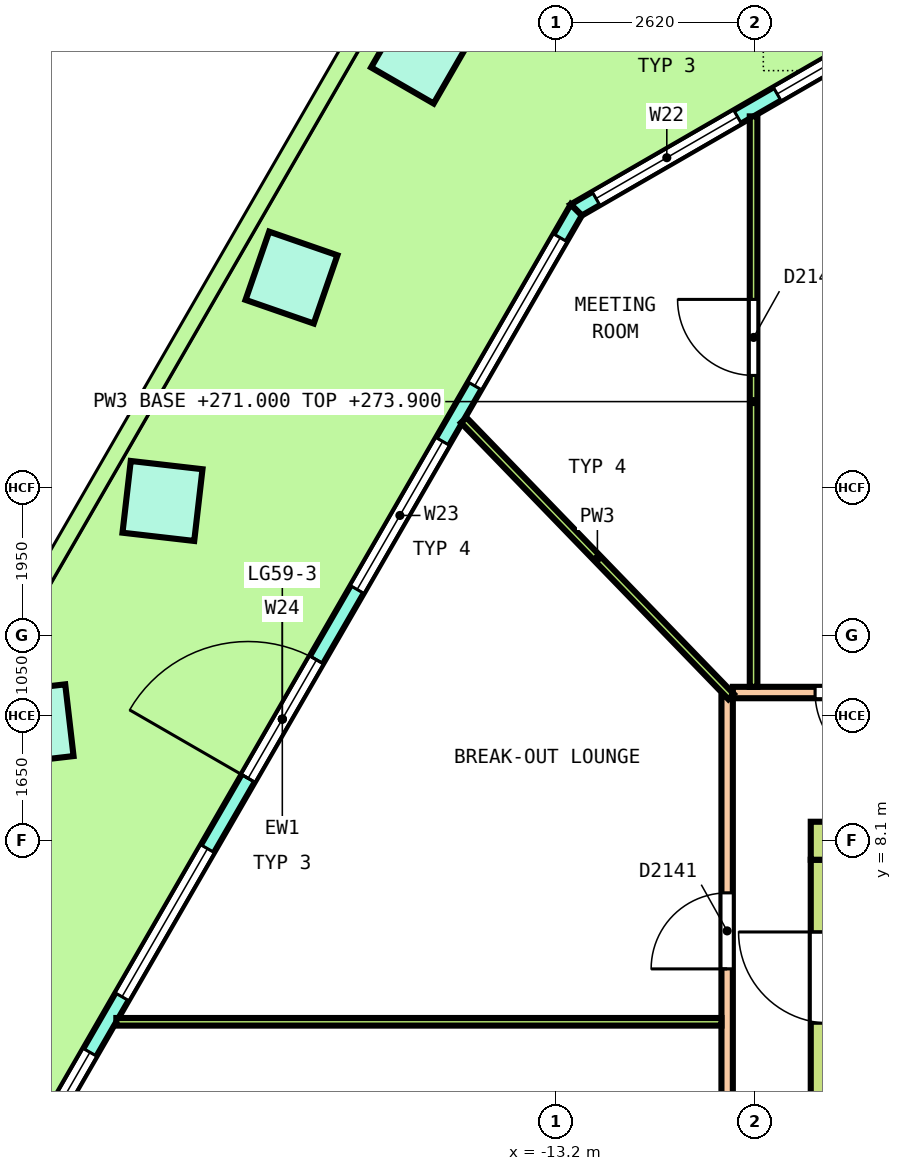
"""IFC4 building model, lengths in metres.
Left out: names, types, materials, properties, quantities, classifications, styles, units other than length and angle.
Written with IfcOpenShell. Run it as: python <this file> out.ifc"""

import sys

from ifc_helpers import new_model, si_unit, direction, frame, frame_2d, origin, origin_2d, place, context, subcontext, project, spatial, polyline, rectangle, outline, extrude, element, fill, save


model = new_model("IFC4")
c1 = context("Model", 3, precision=1e-05, world=origin(), true_north=direction((0.0, 1.0)))
c2 = subcontext(c1, "Body", "Model", "MODEL_VIEW")
j1 = project(units=[si_unit("LENGTHUNIT", "METRE"), si_unit("PLANEANGLEUNIT", "RADIAN")], contexts=[c1])
p1 = place(None, origin())
s1 = spatial("IfcSite", under=j1, at=p1, CompositionType="ELEMENT")
p2 = place(p1, origin())
s2 = spatial("IfcBuilding", under=s1, at=p2, CompositionType="ELEMENT")
p3 = place(p2, frame((0.0, 0.0, 271.0)))
s3 = spatial("IfcBuildingStorey", under=s2, at=p3, CompositionType="ELEMENT", Elevation=271.0)
p4 = place(p3, frame((-14.985, 18.448, 0.0), z_axis=(-0.036230378439, 0.0, 0.99934346432), x_axis=(-0.499425499283, -0.866167613071, -0.018106262248)))
e1 = element("IfcColumn", 1, at=p4, inside=s3, PredefinedType="COLUMN", context=c2, shape_type="SweptSolid", body=[
    extrude(rectangle(XDim=0.95, YDim=0.95, at=origin_2d()), origin(), (0.0, 0.0, 1.0), 3.652),
])
p5 = place(p3, frame((-16.682, 15.509, 0.0), z_axis=(-0.032624119908, 0.006284154245, 0.999447935715), x_axis=(-0.500036299202, -0.865936128062, -0.010877573109)))
e2 = element("IfcColumn", 2, at=p5, inside=s3, PredefinedType="COLUMN", context=c2, shape_type="SweptSolid", body=[
    extrude(rectangle(XDim=0.95, YDim=0.95, at=origin_2d()), origin(), (0.0, 0.0, 1.0), 3.652),
])
p6 = place(p3, frame((-18.379, 12.57, 0.0), z_axis=(-0.029015583354, 0.012568962375, 0.99949993352), x_axis=(-0.499848966802, -0.86610502362, -0.003619177736)))
e3 = element("IfcColumn", 3, at=p6, inside=s3, PredefinedType="COLUMN", context=c2, shape_type="SweptSolid", body=[
    extrude(rectangle(XDim=0.95, YDim=0.95, at=origin_2d()), origin(), (0.0, 0.0, 1.0), 3.652),
])
p7 = place(p3, frame((-20.075, 9.631, 0.0), z_axis=(-0.025405304683, 0.018920266383, 0.999498171091), x_axis=(-0.501003025271, -0.865437843341, 0.003648010707)))
e4 = element("IfcColumn", 4, at=p7, inside=s3, PredefinedType="COLUMN", context=c2, shape_type="SweptSolid", body=[
    extrude(rectangle(XDim=0.95, YDim=0.95, at=origin_2d()), origin(), (0.0, 0.0, 1.0), 3.652),
])
p8 = place(p3, frame((-8.169, 19.15, 0.0), z_axis=(0.0, 0.0, 1.0), x_axis=(-0.866026017613, -0.499998936816, 0.0)))
e5 = element("IfcWall", 5, at=p8, inside=s3, PredefinedType="SOLIDWALL", context=c2, shape_type="SweptSolid", body=[
    extrude(outline(polyline([(-0.027, -0.1), (1.084, -0.1), (2.196, -0.1), (3.307, -0.1), (4.419, -0.1), (5.53, -0.1), (5.477, 0.1), (4.387, 0.1), (3.297, 0.1), (2.207, 0.1), (1.117, 0.1), (0.027, 0.1), (-0.027, -0.1)])), origin(), (0.0, 0.0, 1.0), 3.7),
])
p9 = place(p8, frame((0.301, 0.0, 0.1)))
e6 = element("IfcOpeningElement", 6, at=p9, cuts=e5, PredefinedType="OPENING", context=c2, shape_type="SweptSolid", body=[
    extrude(rectangle(XDim=2.15, YDim=2.75, at=frame_2d((1.075, 1.375))), frame((0.0, 0.11, 0.0), z_axis=(0.0, -1.0, 0.0), x_axis=(1.0, 0.0, 0.0)), (0.0, 0.0, 1.0), 0.22),
])
p10 = place(p8, frame((3.052, 0.0, 0.1)))
e7 = element("IfcOpeningElement", 7, at=p10, cuts=e5, PredefinedType="OPENING", context=c2, shape_type="SweptSolid", body=[
    extrude(rectangle(XDim=2.15, YDim=2.75, at=frame_2d((1.075, 1.375))), frame((0.0, 0.11, 0.0), z_axis=(0.0, -1.0, 0.0), x_axis=(1.0, 0.0, 0.0)), (0.0, 0.0, 1.0), 0.22),
])
p11 = place(p3, frame((-12.935, 16.398, 0.0), z_axis=(0.0, 0.0, 1.0), x_axis=(-0.500001185373, -0.866024719408, 0.0)))
e8 = element("IfcWall", 8, at=p11, inside=s3, PredefinedType="SOLIDWALL", context=c2, shape_type="SweptSolid", body=[
    extrude(outline(polyline([(-0.027, -0.1), (1.008, -0.1), (2.043, -0.1), (3.077, -0.1), (4.112, -0.1), (5.147, -0.1), (6.182, -0.1), (7.216, -0.1), (8.251, -0.1), (9.286, -0.1), (10.321, -0.1), (11.355, -0.1), (12.39, -0.1), (13.425, -0.1), (14.459, -0.1), (15.494, -0.1), (15.44, 0.1), (14.413, 0.1), (13.385, 0.1), (12.358, 0.1), (11.33, 0.1), (10.302, 0.1), (9.275, 0.1), (8.247, 0.1), (7.22, 0.1), (6.192, 0.1), (5.165, 0.1), (4.137, 0.1), (3.11, 0.1), (2.082, 0.1), (1.054, 0.1), (0.027, 0.1), (-0.027, -0.1)])), origin(), (0.0, 0.0, 1.0), 3.7),
])
p12 = place(p11, frame((0.422, 0.0, 0.1)))
e9 = element("IfcOpeningElement", 9, at=p12, cuts=e8, PredefinedType="OPENING", context=c2, shape_type="SweptSolid", body=[
    extrude(rectangle(XDim=2.25, YDim=2.75, at=frame_2d((1.125, 1.375))), frame((0.0, 0.11, 0.0), z_axis=(0.0, -1.0, 0.0), x_axis=(1.0, 0.0, 0.0)), (0.0, 0.0, 1.0), 0.22),
])
p13 = place(p11, frame((3.515, 0.0, 0.1)))
e10 = element("IfcOpeningElement", 10, at=p13, cuts=e8, PredefinedType="OPENING", context=c2, shape_type="SweptSolid", body=[
    extrude(rectangle(XDim=2.25, YDim=2.75, at=frame_2d((1.125, 1.375))), frame((0.0, 0.11, 0.0), z_axis=(0.0, -1.0, 0.0), x_axis=(1.0, 0.0, 0.0)), (0.0, 0.0, 1.0), 0.22),
])
p14 = place(p11, frame((6.834, 0.0, 0.0)))
e11 = element("IfcOpeningElement", 11, at=p14, cuts=e8, PredefinedType="OPENING", context=c2, shape_type="SweptSolid", body=[
    extrude(rectangle(XDim=1.8, YDim=2.4, at=frame_2d((0.9, 1.2))), frame((0.0, 0.11, 0.0), z_axis=(0.0, -1.0, 0.0), x_axis=(1.0, 0.0, 0.0)), (0.0, 0.0, 1.0), 0.22),
])
p15 = place(p11, frame((6.834, 0.0, 2.55)))
e12 = element("IfcOpeningElement", 12, at=p15, cuts=e8, PredefinedType="OPENING", context=c2, shape_type="SweptSolid", body=[
    extrude(rectangle(XDim=1.8, YDim=0.3, at=frame_2d((0.9, 0.15))), frame((0.0, 0.11, 0.0), z_axis=(0.0, -1.0, 0.0), x_axis=(1.0, 0.0, 0.0)), (0.0, 0.0, 1.0), 0.22),
])
p16 = place(p11, frame((9.702, 0.0, 0.1)))
e13 = element("IfcOpeningElement", 13, at=p16, cuts=e8, PredefinedType="OPENING", context=c2, shape_type="SweptSolid", body=[
    extrude(rectangle(XDim=2.25, YDim=2.75, at=frame_2d((1.125, 1.375))), frame((0.0, 0.11, 0.0), z_axis=(0.0, -1.0, 0.0), x_axis=(1.0, 0.0, 0.0)), (0.0, 0.0, 1.0), 0.22),
])
p17 = place(p11, frame((12.796, 0.0, 0.1)))
e14 = element("IfcOpeningElement", 14, at=p17, cuts=e8, PredefinedType="OPENING", context=c2, shape_type="SweptSolid", body=[
    extrude(rectangle(XDim=2.25, YDim=2.75, at=frame_2d((1.125, 1.375))), frame((0.0, 0.11, 0.0), z_axis=(0.0, -1.0, 0.0), x_axis=(1.0, 0.0, 0.0)), (0.0, 0.0, 1.0), 0.22),
])
p18 = place(p3, frame((-9.85, 8.1, 0.0), z_axis=(0.0, 0.0, 1.0), x_axis=(1.0, 0.0, 0.0)))
e15 = element("IfcWall", 15, at=p18, inside=s3, PredefinedType="SHEAR", context=c2, shape_type="SweptSolid", body=[
    extrude(rectangle(XDim=19.7, YDim=0.5, at=frame_2d((9.85, 0.0))), origin(), (0.0, 0.0, 1.0), 3.7),
])
p19 = place(p18, frame((10.775, 0.0, 0.0)))
e16 = element("IfcOpeningElement", 16, at=p19, cuts=e15, PredefinedType="OPENING", context=c2, shape_type="SweptSolid", body=[
    extrude(rectangle(XDim=1.4, YDim=2.1, at=frame_2d((0.7, 1.05))), frame((0.0, 0.26, 0.0), z_axis=(0.0, -1.0, 0.0), x_axis=(1.0, 0.0, 0.0)), (0.0, 0.0, 1.0), 0.52),
])
p20 = place(p3, frame((-9.6, -7.85, 0.0), z_axis=(0.0, 0.0, 1.0), x_axis=(0.0, 1.0, 0.0)))
e17 = element("IfcWall", 17, at=p20, inside=s3, PredefinedType="SHEAR", context=c2, shape_type="SweptSolid", body=[
    extrude(rectangle(XDim=15.7, YDim=0.5, at=frame_2d((7.85, 0.0))), origin(), (0.0, 0.0, 1.0), 3.7),
])
p21 = place(p20, frame((6.65, 0.0, 0.0)))
e18 = element("IfcOpeningElement", 18, at=p21, cuts=e17, PredefinedType="OPENING", context=c2, shape_type="SweptSolid", body=[
    extrude(rectangle(XDim=2.4, YDim=2.1, at=frame_2d((1.2, 1.05))), frame((0.0, 0.26, 0.0), z_axis=(0.0, -1.0, 0.0), x_axis=(1.0, 0.0, 0.0)), (0.0, 0.0, 1.0), 0.52),
])
p22 = place(p20, frame((13.55, 0.0, 0.0)))
e19 = element("IfcOpeningElement", 19, at=p22, cuts=e17, PredefinedType="OPENING", context=c2, shape_type="SweptSolid", body=[
    extrude(rectangle(XDim=1.2, YDim=2.1, at=frame_2d((0.6, 1.05))), frame((0.0, 0.26, 0.0), z_axis=(0.0, -1.0, 0.0), x_axis=(1.0, 0.0, 0.0)), (0.0, 0.0, 1.0), 0.52),
])
p23 = place(p20, frame((0.95, 0.0, 0.0)))
e20 = element("IfcOpeningElement", 20, at=p23, cuts=e17, PredefinedType="OPENING", context=c2, shape_type="SweptSolid", body=[
    extrude(rectangle(XDim=1.2, YDim=2.1, at=frame_2d((0.6, 1.05))), frame((0.0, 0.26, 0.0), z_axis=(0.0, -1.0, 0.0), x_axis=(1.0, 0.0, 0.0)), (0.0, 0.0, 1.0), 0.52),
])
p24 = place(p3, frame((-10.875, 10.05, 0.0), z_axis=(0.0, 0.0, 1.0), x_axis=(1.0, 0.0, 0.0)))
e21 = element("IfcWall", 21, at=p24, inside=s3, PredefinedType="PARTITIONING", context=c2, shape_type="SweptSolid", body=[
    extrude(rectangle(XDim=21.775, YDim=0.15, at=frame_2d((10.887, 0.0))), origin(), (0.0, 0.0, 1.0), 2.9),
])
p25 = place(p24, frame((17.089, 0.0, 0.0)))
e22 = element("IfcOpeningElement", 22, at=p25, cuts=e21, PredefinedType="OPENING", context=c2, shape_type="SweptSolid", body=[
    extrude(rectangle(XDim=1.2, YDim=2.1, at=frame_2d((0.6, 1.05))), frame((0.0, 0.085, 0.0), z_axis=(0.0, -1.0, 0.0), x_axis=(1.0, 0.0, 0.0)), (0.0, 0.0, 1.0), 0.17),
])
p26 = place(p24, frame((14.048, 0.0, 0.0)))
e23 = element("IfcOpeningElement", 23, at=p26, cuts=e21, PredefinedType="OPENING", context=c2, shape_type="SweptSolid", body=[
    extrude(rectangle(XDim=1.0, YDim=2.1, at=frame_2d((0.5, 1.05))), frame((0.0, 0.085, 0.0), z_axis=(0.0, -1.0, 0.0), x_axis=(1.0, 0.0, 0.0)), (0.0, 0.0, 1.0), 0.17),
])
p27 = place(p24, frame((7.521, 0.0, 0.0)))
e24 = element("IfcOpeningElement", 24, at=p27, cuts=e21, PredefinedType="OPENING", context=c2, shape_type="SweptSolid", body=[
    extrude(rectangle(XDim=1.0, YDim=2.1, at=frame_2d((0.5, 1.05))), frame((0.0, 0.085, 0.0), z_axis=(0.0, -1.0, 0.0), x_axis=(1.0, 0.0, 0.0)), (0.0, 0.0, 1.0), 0.17),
])
p28 = place(p24, frame((4.213, 0.0, 0.0)))
e25 = element("IfcOpeningElement", 25, at=p28, cuts=e21, PredefinedType="OPENING", context=c2, shape_type="SweptSolid", body=[
    extrude(rectangle(XDim=1.0, YDim=2.1, at=frame_2d((0.5, 1.05))), frame((0.0, 0.085, 0.0), z_axis=(0.0, -1.0, 0.0), x_axis=(1.0, 0.0, 0.0)), (0.0, 0.0, 1.0), 0.17),
])
p29 = place(p24, frame((1.082, 0.0, 0.0)))
e26 = element("IfcOpeningElement", 26, at=p29, cuts=e21, PredefinedType="OPENING", context=c2, shape_type="SweptSolid", body=[
    extrude(rectangle(XDim=1.0, YDim=2.1, at=frame_2d((0.5, 1.05))), frame((0.0, 0.085, 0.0), z_axis=(0.0, -1.0, 0.0), x_axis=(1.0, 0.0, 0.0)), (0.0, 0.0, 1.0), 0.17),
])
p30 = place(p3, frame((-10.95, -7.025, 0.0), z_axis=(0.0, 0.0, 1.0), x_axis=(0.0, 1.0, 0.0)))
e27 = element("IfcWall", 27, at=p30, inside=s3, PredefinedType="PARTITIONING", context=c2, shape_type="SweptSolid", body=[
    extrude(rectangle(XDim=17.025, YDim=0.15, at=frame_2d((8.512, 0.0))), origin(), (0.0, 0.0, 1.0), 2.9),
])
p31 = place(p30, frame((13.439, 0.0, 0.0)))
e28 = element("IfcOpeningElement", 28, at=p31, cuts=e27, PredefinedType="OPENING", context=c2, shape_type="SweptSolid", body=[
    extrude(rectangle(XDim=1.0, YDim=2.1, at=frame_2d((0.5, 1.05))), frame((0.0, 0.085, 0.0), z_axis=(0.0, -1.0, 0.0), x_axis=(1.0, 0.0, 0.0)), (0.0, 0.0, 1.0), 0.17),
])
p32 = place(p30, frame((8.972, 0.0, 0.0)))
e29 = element("IfcOpeningElement", 29, at=p32, cuts=e27, PredefinedType="OPENING", context=c2, shape_type="SweptSolid", body=[
    extrude(rectangle(XDim=1.2, YDim=2.1, at=frame_2d((0.6, 1.05))), frame((0.0, 0.085, 0.0), z_axis=(0.0, -1.0, 0.0), x_axis=(1.0, 0.0, 0.0)), (0.0, 0.0, 1.0), 0.17),
])
p33 = place(p3, frame((-18.986, 5.718, 0.0), z_axis=(0.0, 0.0, 1.0), x_axis=(1.0, 0.0, 0.0)))
e30 = element("IfcWall", 30, at=p33, inside=s3, PredefinedType="PARTITIONING", context=c2, shape_type="SweptSolid", body=[
    extrude(rectangle(XDim=7.961, YDim=0.1, at=frame_2d((3.98, 0.0))), origin(), (0.0, 0.0, 1.0), 2.9),
])
p34 = place(p3, frame((-10.602, 10.125, 0.0), z_axis=(0.0, 0.0, 1.0), x_axis=(0.0, 1.0, 0.0)))
e31 = element("IfcWall", 31, at=p34, inside=s3, PredefinedType="PARTITIONING", context=c2, shape_type="SweptSolid", body=[
    extrude(rectangle(XDim=7.505, YDim=0.1, at=frame_2d((3.752, 0.0))), origin(), (0.0, 0.0, 1.0), 2.9),
])
p35 = place(p34, frame((4.097, 0.0, 0.0)))
e32 = element("IfcOpeningElement", 32, at=p35, cuts=e31, PredefinedType="OPENING", context=c2, shape_type="SweptSolid", body=[
    extrude(rectangle(XDim=1.0, YDim=2.1, at=frame_2d((0.5, 1.05))), frame((0.0, 0.06, 0.0), z_axis=(0.0, -1.0, 0.0), x_axis=(1.0, 0.0, 0.0)), (0.0, 0.0, 1.0), 0.12),
])
p36 = place(p3, frame((-14.416, 13.634, 0.0), z_axis=(0.0, 0.0, 1.0), x_axis=(0.69518833949, -0.718827637641, 0.0)))
e33 = element("IfcWall", 33, at=p36, inside=s3, PredefinedType="PARTITIONING", context=c2, shape_type="SweptSolid", body=[
    extrude(rectangle(XDim=5.061, YDim=0.1, at=frame_2d((2.53, 0.0))), origin(), (0.0, 0.0, 1.0), 2.9),
])
p37 = place(p9, origin())
e34 = element("IfcWindow", 34, at=p37, inside=s3, PartitioningType="SINGLE_PANEL", PredefinedType="WINDOW", context=c2, shape_type="SweptSolid", body=[
    extrude(rectangle(XDim=2.15, YDim=2.75, at=frame_2d((1.075, 1.375))), frame((0.0, 0.03, 0.0), z_axis=(0.0, -1.0, 0.0), x_axis=(1.0, 0.0, 0.0)), (0.0, 0.0, 1.0), 0.06),
])
fill(e6, e34)
p38 = place(p10, origin())
e35 = element("IfcWindow", 35, at=p38, inside=s3, PartitioningType="SINGLE_PANEL", PredefinedType="WINDOW", context=c2, shape_type="SweptSolid", body=[
    extrude(rectangle(XDim=2.15, YDim=2.75, at=frame_2d((1.075, 1.375))), frame((0.0, 0.03, 0.0), z_axis=(0.0, -1.0, 0.0), x_axis=(1.0, 0.0, 0.0)), (0.0, 0.0, 1.0), 0.06),
])
fill(e7, e35)
p39 = place(p12, origin())
e36 = element("IfcWindow", 36, at=p39, inside=s3, PartitioningType="SINGLE_PANEL", PredefinedType="WINDOW", context=c2, shape_type="SweptSolid", body=[
    extrude(rectangle(XDim=2.25, YDim=2.75, at=frame_2d((1.125, 1.375))), frame((0.0, 0.03, 0.0), z_axis=(0.0, -1.0, 0.0), x_axis=(1.0, 0.0, 0.0)), (0.0, 0.0, 1.0), 0.06),
])
fill(e9, e36)
p40 = place(p13, origin())
e37 = element("IfcWindow", 37, at=p40, inside=s3, PartitioningType="SINGLE_PANEL", PredefinedType="WINDOW", context=c2, shape_type="SweptSolid", body=[
    extrude(rectangle(XDim=2.25, YDim=2.75, at=frame_2d((1.125, 1.375))), frame((0.0, 0.03, 0.0), z_axis=(0.0, -1.0, 0.0), x_axis=(1.0, 0.0, 0.0)), (0.0, 0.0, 1.0), 0.06),
])
fill(e10, e37)
p41 = place(p14, origin())
e38 = element("IfcDoor", 38, at=p41, inside=s3, OperationType="DOUBLE_DOOR_SINGLE_SWING", PredefinedType="DOOR", context=c2, shape_type="SweptSolid", body=[
    extrude(rectangle(XDim=1.8, YDim=2.4, at=frame_2d((0.9, 1.2))), frame((0.0, 0.025, 0.0), z_axis=(0.0, -1.0, 0.0), x_axis=(1.0, 0.0, 0.0)), (0.0, 0.0, 1.0), 0.05),
])
fill(e11, e38)
p42 = place(p15, origin())
e39 = element("IfcWindow", 39, at=p42, inside=s3, PartitioningType="SINGLE_PANEL", PredefinedType="WINDOW", context=c2, shape_type="SweptSolid", body=[
    extrude(rectangle(XDim=1.8, YDim=0.3, at=frame_2d((0.9, 0.15))), frame((0.0, 0.03, 0.0), z_axis=(0.0, -1.0, 0.0), x_axis=(1.0, 0.0, 0.0)), (0.0, 0.0, 1.0), 0.06),
])
fill(e12, e39)
p43 = place(p16, origin())
e40 = element("IfcWindow", 40, at=p43, inside=s3, PartitioningType="SINGLE_PANEL", PredefinedType="WINDOW", context=c2, shape_type="SweptSolid", body=[
    extrude(rectangle(XDim=2.25, YDim=2.75, at=frame_2d((1.125, 1.375))), frame((0.0, 0.03, 0.0), z_axis=(0.0, -1.0, 0.0), x_axis=(1.0, 0.0, 0.0)), (0.0, 0.0, 1.0), 0.06),
])
fill(e13, e40)
p44 = place(p17, origin())
e41 = element("IfcWindow", 41, at=p44, inside=s3, PartitioningType="SINGLE_PANEL", PredefinedType="WINDOW", context=c2, shape_type="SweptSolid", body=[
    extrude(rectangle(XDim=2.25, YDim=2.75, at=frame_2d((1.125, 1.375))), frame((0.0, 0.03, 0.0), z_axis=(0.0, -1.0, 0.0), x_axis=(1.0, 0.0, 0.0)), (0.0, 0.0, 1.0), 0.06),
])
fill(e14, e41)
p45 = place(p22, origin())
e42 = element("IfcDoor", 42, at=p45, inside=s3, OperationType="SINGLE_SWING_RIGHT", PredefinedType="DOOR", context=c2, shape_type="SweptSolid", body=[
    extrude(rectangle(XDim=1.2, YDim=2.1, at=frame_2d((0.6, 1.05))), frame((0.0, 0.2, 0.0), z_axis=(0.0, -1.0, 0.0), x_axis=(1.0, 0.0, 0.0)), (0.0, 0.0, 1.0), 0.4),
])
fill(e19, e42)
p46 = place(p29, origin())
e43 = element("IfcDoor", 43, at=p46, inside=s3, OperationType="SINGLE_SWING_RIGHT", PredefinedType="DOOR", context=c2, shape_type="SweptSolid", body=[
    extrude(rectangle(XDim=1.0, YDim=2.1, at=frame_2d((0.5, 1.05))), frame((0.0, 0.025, 0.0), z_axis=(0.0, -1.0, 0.0), x_axis=(1.0, 0.0, 0.0)), (0.0, 0.0, 1.0), 0.05),
])
fill(e26, e43)
p47 = place(p35, origin())
e44 = element("IfcDoor", 44, at=p47, inside=s3, OperationType="SINGLE_SWING_LEFT", PredefinedType="DOOR", context=c2, shape_type="SweptSolid", body=[
    extrude(rectangle(XDim=1.0, YDim=2.1, at=frame_2d((0.5, 1.05))), frame((0.0, 0.025, 0.0), z_axis=(0.0, -1.0, 0.0), x_axis=(1.0, 0.0, 0.0)), (0.0, 0.0, 1.0), 0.05),
])
fill(e32, e44)
p48 = place(p31, origin())
e45 = element("IfcDoor", 45, at=p48, inside=s3, OperationType="SINGLE_SWING_LEFT", PredefinedType="DOOR", context=c2, shape_type="SweptSolid", body=[
    extrude(rectangle(XDim=1.0, YDim=2.1, at=frame_2d((0.5, 1.05))), frame((0.0, 0.025, 0.0), z_axis=(0.0, -1.0, 0.0), x_axis=(1.0, 0.0, 0.0)), (0.0, 0.0, 1.0), 0.05),
])
fill(e28, e45)
save(model, sys.argv[1])
